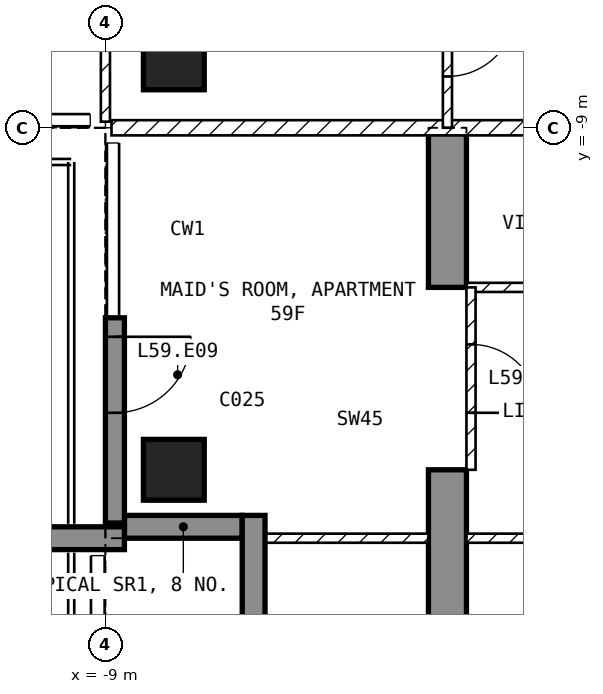
"""IFC4 building model, lengths in metres.
Left out: names, types, materials, properties, quantities, classifications, styles, units other than length and angle.
Written with IfcOpenShell. Run it as: python <this file> out.ifc"""

import sys

from ifc_helpers import new_model, si_unit, direction, frame, frame_2d, origin, origin_2d, place, context, subcontext, project, spatial, polyline, rectangle, outline, extrude, element, fill, save


model = new_model("IFC4")
c1 = context("Model", 3, precision=1e-05, world=origin(), true_north=direction((0.0, 1.0)))
c2 = subcontext(c1, "Body", "Model", "MODEL_VIEW")
j1 = project(units=[si_unit("LENGTHUNIT", "METRE"), si_unit("PLANEANGLEUNIT", "RADIAN")], contexts=[c1])
p1 = place(None, origin())
s1 = spatial("IfcSite", under=j1, at=p1, CompositionType="ELEMENT")
p2 = place(p1, origin())
s2 = spatial("IfcBuilding", under=s1, at=p2, CompositionType="ELEMENT")
p3 = place(p2, frame((0.0, 0.0, 236.0)))
s3 = spatial("IfcBuildingStorey", under=s2, at=p3, CompositionType="ELEMENT", Elevation=236.0)
for number, where, z_axis, x_axis in (
    (1, (-8.1, -13.5, -0.25), (0.0, 0.0, 1.0), (1.0, 0.0, 0.0)),
    (2, (-8.1, -8.1, -0.25), (0.0, 0.0, 1.0), (1.0, 0.0, 0.0)),
):
    element("IfcColumn", number, at=place(p3, frame(where, z_axis=z_axis, x_axis=x_axis)), inside=s3, PredefinedType="COLUMN", context=c2, shape_type="SweptSolid", body=[
        extrude(rectangle(XDim=0.8, YDim=0.8, at=origin_2d()), origin(), (0.0, 0.0, 1.0), 3.5),
    ])
p4 = place(p3, frame((-4.75, -16.7, -0.25), z_axis=(1.0, 0.0, 0.0), x_axis=(0.0, 1.0, 0.0)))
e3 = element("IfcWall", 3, at=p4, inside=s3, PredefinedType="SHEAR", context=c2, shape_type="SweptSolid", body=[
    extrude(outline(polyline([(0.0, 0.0), (3.2, 0.0), (3.2, 2.65), (5.6, 2.65), (5.6, 0.0), (7.7, 0.0), (7.7, 3.5), (0.0, 3.5), (0.0, 0.0)])), origin(), (0.0, 0.0, 1.0), 0.5),
])
p5 = place(p3, frame((-8.875, -11.5, 0.0), z_axis=(0.0, 0.0, 1.0), x_axis=(0.0, -1.0, 0.0)))
e4 = element("IfcWall", 4, at=p5, inside=s3, PredefinedType="SOLIDWALL", context=c2, shape_type="SweptSolid", body=[
    extrude(rectangle(XDim=2.7, YDim=0.25, at=frame_2d((1.35, 0.0))), origin(), (0.0, 0.0, 1.0), 3.25),
])
p6 = place(p5, frame((0.25, 0.0, 0.0)))
e5 = element("IfcOpeningElement", 5, at=p6, cuts=e4, PredefinedType="OPENING", context=c2, shape_type="SweptSolid", body=[
    extrude(rectangle(XDim=1.0, YDim=2.4, at=frame_2d((0.5, 1.2))), frame((0.0, 0.135, 0.0), z_axis=(0.0, -1.0, 0.0), x_axis=(1.0, 0.0, 0.0)), (0.0, 0.0, 1.0), 0.27),
])
p7 = place(p3, frame((-8.75, -14.25, 0.0), z_axis=(0.0, 0.0, 1.0), x_axis=(1.0, 0.0, 0.0)))
e6 = element("IfcWall", 6, at=p7, inside=s3, PredefinedType="SOLIDWALL", context=c2, shape_type="SweptSolid", body=[
    extrude(rectangle(XDim=1.55, YDim=0.3, at=frame_2d((0.775, 0.0))), origin(), (0.0, 0.0, 1.0), 3.25),
])
p8 = place(p3, frame((-7.05, -14.1, 0.0), z_axis=(0.0, 0.0, 1.0), x_axis=(0.0, -1.0, 0.0)))
e7 = element("IfcWall", 7, at=p8, inside=s3, PredefinedType="SOLIDWALL", context=c2, shape_type="SweptSolid", body=[
    extrude(rectangle(XDim=1.8, YDim=0.3, at=frame_2d((0.9, 0.0))), origin(), (0.0, 0.0, 1.0), 3.25),
])
p9 = place(p3, frame((-8.75, -14.4, 0.0), z_axis=(0.0, 0.0, 1.0), x_axis=(-1.0, 0.0, 0.0)))
e8 = element("IfcWall", 8, at=p9, inside=s3, PredefinedType="SOLIDWALL", context=c2, shape_type="SweptSolid", body=[
    extrude(rectangle(XDim=2.95, YDim=0.3, at=frame_2d((1.475, 0.0))), origin(), (0.0, 0.0, 1.0), 3.25),
])
p10 = place(p3, frame((8.92, -9.0, 0.0), z_axis=(0.0, 0.0, 1.0), x_axis=(-1.0, 0.0, 0.0)))
e9 = element("IfcWall", 9, at=p10, inside=s3, PredefinedType="PARTITIONING", context=c2, shape_type="SweptSolid", body=[
    extrude(rectangle(XDim=17.84, YDim=0.2, at=frame_2d((8.92, 0.0))), origin(), (0.0, 0.0, 1.0), 3.25),
])
p11 = place(p10, frame((8.42, 0.0, 0.0)))
e10 = element("IfcOpeningElement", 10, at=p11, cuts=e9, PredefinedType="OPENING", context=c2, shape_type="SweptSolid", body=[
    extrude(rectangle(XDim=1.0, YDim=2.1, at=frame_2d((0.5, 1.05))), frame((0.0, 0.11, 0.0), z_axis=(0.0, -1.0, 0.0), x_axis=(1.0, 0.0, 0.0)), (0.0, 0.0, 1.0), 0.22),
])
p12 = place(p3, frame((-9.0, -1.3, 0.0), z_axis=(0.0, 0.0, 1.0), x_axis=(0.0, -1.0, 0.0)))
e11 = element("IfcWall", 11, at=p12, inside=s3, PredefinedType="PARTITIONING", context=c2, shape_type="SweptSolid", body=[
    extrude(rectangle(XDim=7.62, YDim=0.12, at=frame_2d((3.81, 0.0))), origin(), (0.0, 0.0, 1.0), 3.25),
])
p13 = place(p12, frame((0.85, 0.0, 0.0)))
e12 = element("IfcOpeningElement", 12, at=p13, cuts=e11, PredefinedType="OPENING", context=c2, shape_type="SweptSolid", body=[
    extrude(rectangle(XDim=0.9, YDim=2.1, at=frame_2d((0.45, 1.05))), frame((0.0, 0.07, 0.0), z_axis=(0.0, -1.0, 0.0), x_axis=(1.0, 0.0, 0.0)), (0.0, 0.0, 1.0), 0.14),
])
p14 = place(p3, frame((-4.5, -6.75, 0.0), z_axis=(0.0, 0.0, 1.0), x_axis=(0.0, -1.0, 0.0)))
e13 = element("IfcWall", 13, at=p14, inside=s3, PredefinedType="PARTITIONING", context=c2, shape_type="SweptSolid", body=[
    extrude(rectangle(XDim=2.25, YDim=0.12, at=frame_2d((1.125, 0.0))), origin(), (0.0, 0.0, 1.0), 3.25),
])
p15 = place(p14, frame((0.675, 0.0, 0.0)))
e14 = element("IfcOpeningElement", 14, at=p15, cuts=e13, PredefinedType="OPENING", context=c2, shape_type="SweptSolid", body=[
    extrude(rectangle(XDim=0.9, YDim=2.1, at=frame_2d((0.45, 1.05))), frame((0.0, 0.07, 0.0), z_axis=(0.0, -1.0, 0.0), x_axis=(1.0, 0.0, 0.0)), (0.0, 0.0, 1.0), 0.14),
])
p16 = place(p3, frame((2.1, -11.1, 0.0), z_axis=(0.0, 0.0, 1.0), x_axis=(-1.0, 0.0, 0.0)))
e15 = element("IfcWall", 15, at=p16, inside=s3, PredefinedType="PARTITIONING", context=c2, shape_type="SweptSolid", body=[
    extrude(rectangle(XDim=6.35, YDim=0.12, at=frame_2d((3.175, 0.0))), origin(), (0.0, 0.0, 1.0), 3.25),
])
p17 = place(p16, frame((2.725, 0.0, 0.0)))
e16 = element("IfcOpeningElement", 16, at=p17, cuts=e15, PredefinedType="OPENING", context=c2, shape_type="SweptSolid", body=[
    extrude(rectangle(XDim=0.9, YDim=2.1, at=frame_2d((0.45, 1.05))), frame((0.0, 0.07, 0.0), z_axis=(0.0, -1.0, 0.0), x_axis=(1.0, 0.0, 0.0)), (0.0, 0.0, 1.0), 0.14),
])
p18 = place(p3, frame((4.25, -14.4, 0.0), z_axis=(0.0, 0.0, 1.0), x_axis=(-1.0, 0.0, 0.0)))
e17 = element("IfcWall", 17, at=p18, inside=s3, PredefinedType="PARTITIONING", context=c2, shape_type="SweptSolid", body=[
    extrude(rectangle(XDim=8.5, YDim=0.12, at=frame_2d((4.25, 0.0))), origin(), (0.0, 0.0, 1.0), 3.25),
])
p19 = place(p18, frame((5.675, 0.0, 0.0)))
e18 = element("IfcOpeningElement", 18, at=p19, cuts=e17, PredefinedType="OPENING", context=c2, shape_type="SweptSolid", body=[
    extrude(rectangle(XDim=0.9, YDim=2.1, at=frame_2d((0.45, 1.05))), frame((0.0, 0.07, 0.0), z_axis=(0.0, -1.0, 0.0), x_axis=(1.0, 0.0, 0.0)), (0.0, 0.0, 1.0), 0.14),
])
p20 = place(p3, frame((-4.75, -14.4, 0.0), z_axis=(0.0, 0.0, 1.0), x_axis=(-1.0, 0.0, 0.0)))
e19 = element("IfcWall", 19, at=p20, inside=s3, PredefinedType="PARTITIONING", context=c2, shape_type="SweptSolid", body=[
    extrude(rectangle(XDim=2.37, YDim=0.12, at=frame_2d((1.185, 0.0))), origin(), (0.0, 0.0, 1.0), 3.25),
])
p21 = place(p3, frame((-4.19, -11.1, 0.0), z_axis=(0.0, 0.0, 1.0), x_axis=(0.0, -1.0, 0.0)))
e20 = element("IfcWall", 20, at=p21, inside=s3, PredefinedType="PARTITIONING", context=c2, shape_type="SweptSolid", body=[
    extrude(rectangle(XDim=2.4, YDim=0.12, at=frame_2d((1.2, 0.0))), origin(), (0.0, 0.0, 1.0), 2.4),
])
p22 = place(p21, frame((0.75, 0.0, 0.0)))
e21 = element("IfcOpeningElement", 21, at=p22, cuts=e20, PredefinedType="OPENING", context=c2, shape_type="SweptSolid", body=[
    extrude(rectangle(XDim=0.9, YDim=2.1, at=frame_2d((0.45, 1.05))), frame((0.0, 0.07, 0.0), z_axis=(0.0, -1.0, 0.0), x_axis=(1.0, 0.0, 0.0)), (0.0, 0.0, 1.0), 0.14),
])
p23 = place(p6, origin())
e22 = element("IfcDoor", 22, at=p23, inside=s3, OperationType="SINGLE_SWING_LEFT", PredefinedType="DOOR", context=c2, shape_type="SweptSolid", body=[
    extrude(rectangle(XDim=1.0, YDim=2.4, at=frame_2d((0.5, 1.2))), frame((0.0, 0.025, 0.0), z_axis=(0.0, -1.0, 0.0), x_axis=(1.0, 0.0, 0.0)), (0.0, 0.0, 1.0), 0.05),
])
fill(e5, e22)
p24 = place(p15, origin())
e23 = element("IfcDoor", 23, at=p24, inside=s3, OperationType="SINGLE_SWING_LEFT", PredefinedType="DOOR", context=c2, shape_type="SweptSolid", body=[
    extrude(rectangle(XDim=0.9, YDim=2.1, at=frame_2d((0.45, 1.05))), frame((0.0, 0.025, 0.0), z_axis=(0.0, -1.0, 0.0), x_axis=(1.0, 0.0, 0.0)), (0.0, 0.0, 1.0), 0.05),
])
fill(e14, e23)
p25 = place(p22, origin())
e24 = element("IfcDoor", 24, at=p25, inside=s3, OperationType="SINGLE_SWING_RIGHT", PredefinedType="DOOR", context=c2, shape_type="SweptSolid", body=[
    extrude(rectangle(XDim=0.9, YDim=2.1, at=frame_2d((0.45, 1.05))), frame((0.0, 0.025, 0.0), z_axis=(0.0, -1.0, 0.0), x_axis=(1.0, 0.0, 0.0)), (0.0, 0.0, 1.0), 0.05),
])
fill(e21, e24)
save(model, sys.argv[1])
